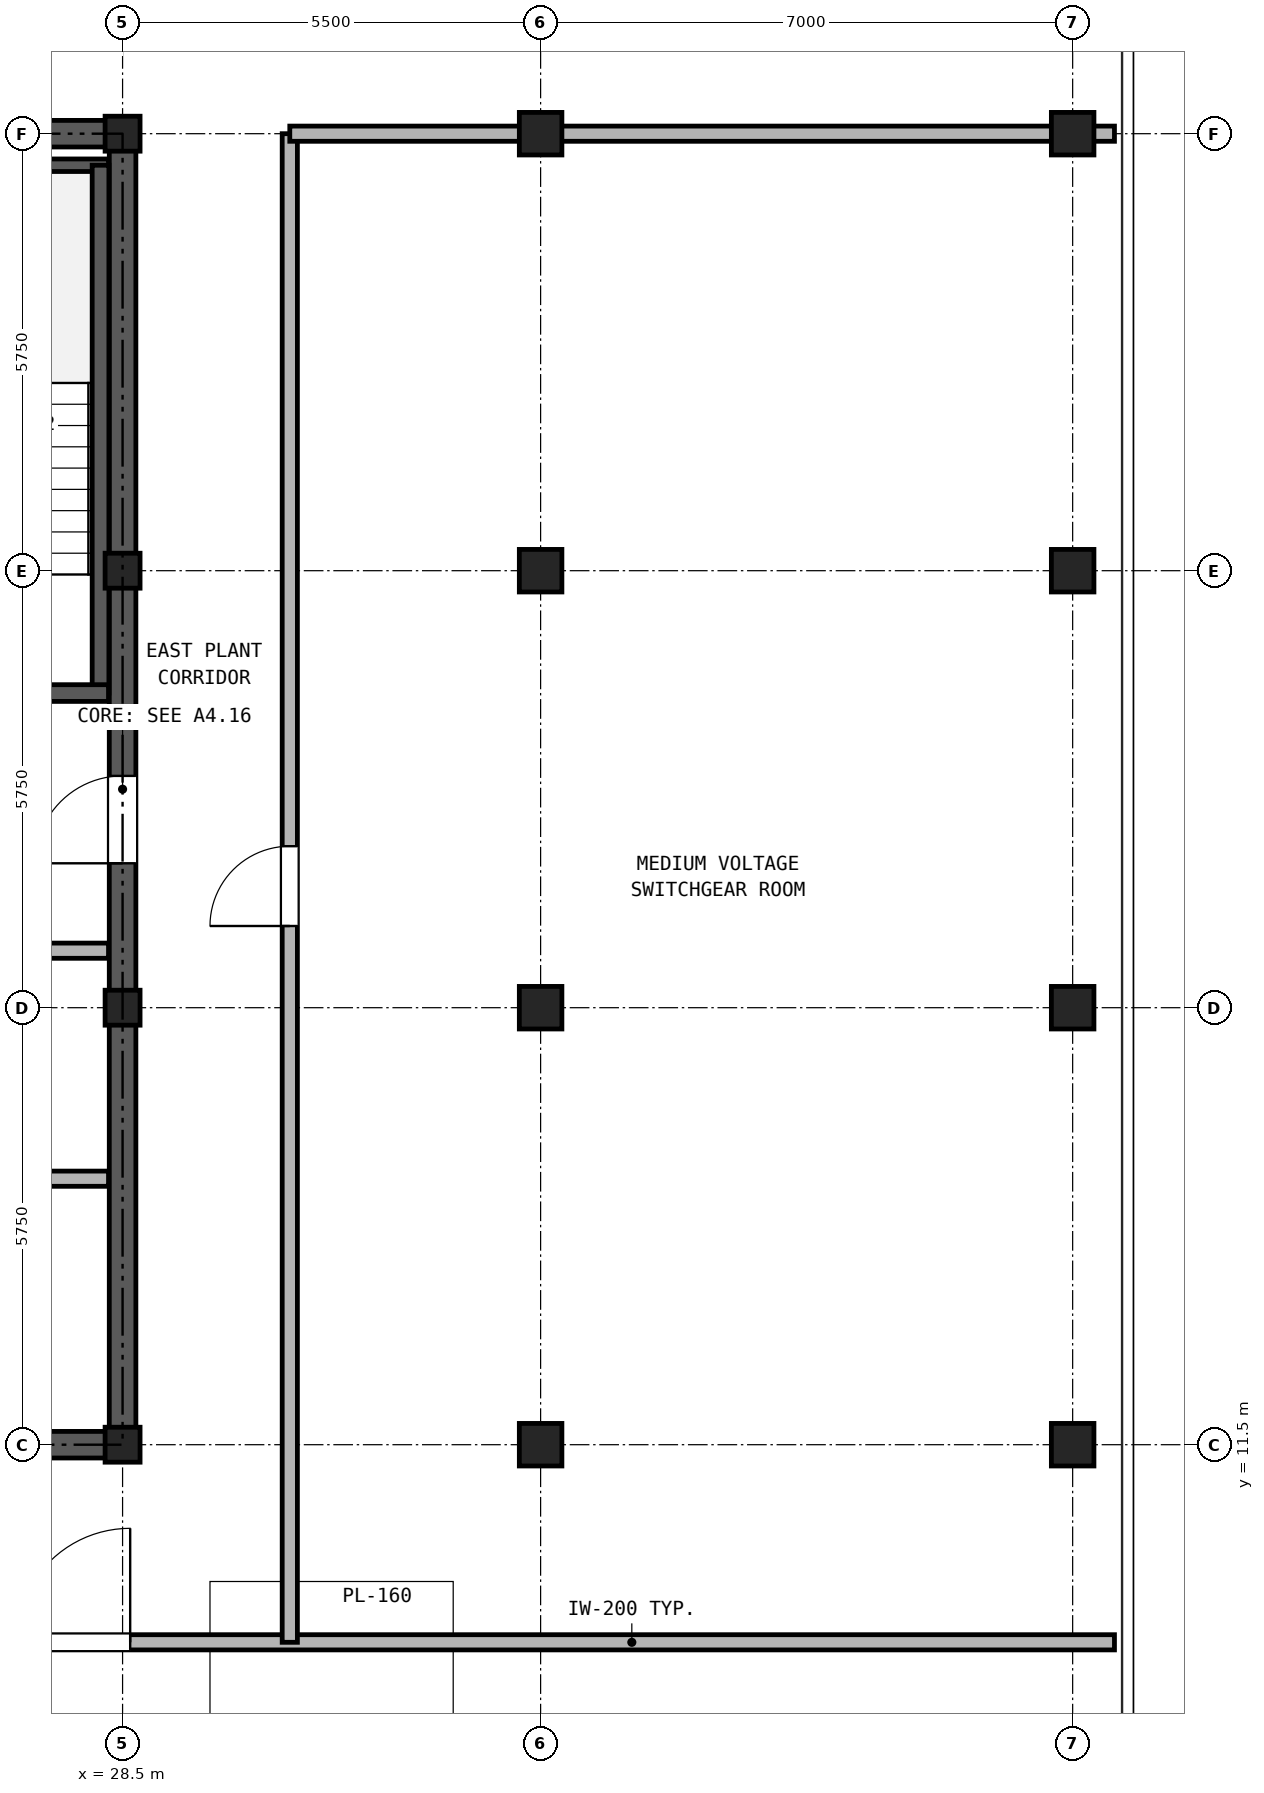
"""IFC4 building model, lengths in metres.
Left out: names, types, materials, properties, quantities, classifications, styles, units other than length and angle.
Written with IfcOpenShell. Run it as: python <this file> out.ifc"""

import sys

from ifc_helpers import new_model, si_unit, direction, frame, frame_2d, origin, origin_2d, place, context, subcontext, project, spatial, rectangle, hollow_rectangle, extrude, source, transform, mapped, element, fill, save


model = new_model("IFC4")
c1 = context("Model", 3, precision=1e-05, world=origin(), true_north=direction((0.0, 1.0)))
c2 = subcontext(c1, "Body", "Model", "MODEL_VIEW")
j1 = project(units=[si_unit("LENGTHUNIT", "METRE"), si_unit("PLANEANGLEUNIT", "RADIAN")], contexts=[c1])
p1 = place(None, origin())
s1 = spatial("IfcSite", under=j1, at=p1, CompositionType="ELEMENT")
p2 = place(p1, origin())
s2 = spatial("IfcBuilding", under=s1, at=p2, CompositionType="ELEMENT")
p3 = place(p2, frame((0.0, 0.0, 282.1)))
s3 = spatial("IfcBuildingStorey", under=s2, at=p3, CompositionType="ELEMENT", Elevation=282.1)
m1 = source(origin(), c2, "Body", "SweptSolid", [
    extrude(hollow_rectangle(XDim=0.56, YDim=0.56, WallThickness=0.03, at=origin_2d()), origin(), (0.0, 0.0, 1.0), 3.38),
])
for number, where, z_axis, x_axis in (
    (1, (41.0, 11.5, 0.0), (0.0, 0.0, 1.0), (1.0, 0.0, 0.0)),
    (2, (41.0, 17.25, 0.0), (0.0, 0.0, 1.0), (1.0, 0.0, 0.0)),
    (3, (41.0, 23.0, 0.0), (0.0, 0.0, 1.0), (1.0, 0.0, 0.0)),
    (4, (41.0, 28.75, 0.0), (0.0, 0.0, 1.0), (1.0, 0.0, 0.0)),
):
    element("IfcColumn", number, at=place(p3, frame(where, z_axis=z_axis, x_axis=x_axis)), inside=s3, PredefinedType="COLUMN", context=c2, shape_type="MappedRepresentation", body=[
        mapped(m1, transform((0.0, 0.0, 0.0), x_axis=(1.0, 0.0, 0.0), y_axis=(0.0, 1.0, 0.0), z_axis=(0.0, 0.0, 1.0), scale=1.0)),
    ])
m2 = source(origin(), c2, "Body", "SweptSolid", [
    extrude(hollow_rectangle(XDim=0.46, YDim=0.46, WallThickness=0.025, at=origin_2d()), origin(), (0.0, 0.0, 1.0), 3.38),
])
for number, where, z_axis, x_axis in (
    (5, (28.5, 11.5, 0.0), (0.0, 0.0, 1.0), (1.0, 0.0, 0.0)),
    (6, (28.5, 17.25, 0.0), (0.0, 0.0, 1.0), (1.0, 0.0, 0.0)),
    (7, (28.5, 23.0, 0.0), (0.0, 0.0, 1.0), (1.0, 0.0, 0.0)),
    (8, (28.5, 28.75, 0.0), (0.0, 0.0, 1.0), (1.0, 0.0, 0.0)),
):
    element("IfcColumn", number, at=place(p3, frame(where, z_axis=z_axis, x_axis=x_axis)), inside=s3, PredefinedType="COLUMN", context=c2, shape_type="MappedRepresentation", body=[
        mapped(m2, transform((0.0, 0.0, 0.0), x_axis=(1.0, 0.0, 0.0), y_axis=(0.0, 1.0, 0.0), z_axis=(0.0, 0.0, 1.0), scale=1.0)),
    ])
for number, where, z_axis, x_axis in (
    (9, (34.0, 11.5, 0.0), (0.0, 0.0, 1.0), (1.0, 0.0, 0.0)),
    (10, (34.0, 17.25, 0.0), (0.0, 0.0, 1.0), (1.0, 0.0, 0.0)),
    (11, (34.0, 23.0, 0.0), (0.0, 0.0, 1.0), (1.0, 0.0, 0.0)),
    (12, (34.0, 28.75, 0.0), (0.0, 0.0, 1.0), (1.0, 0.0, 0.0)),
):
    element("IfcColumn", number, at=place(p3, frame(where, z_axis=z_axis, x_axis=x_axis)), inside=s3, PredefinedType="COLUMN", context=c2, shape_type="MappedRepresentation", body=[
        mapped(m1, transform((0.0, 0.0, 0.0), x_axis=(1.0, 0.0, 0.0), y_axis=(0.0, 1.0, 0.0), z_axis=(0.0, 0.0, 1.0), scale=1.0)),
    ])
p4 = place(p3, frame((18.325, 11.5, 0.0), z_axis=(0.0, 0.0, 1.0), x_axis=(1.0, 0.0, 0.0)))
e13 = element("IfcWall", 13, at=p4, inside=s3, PredefinedType="SHEAR", context=c2, shape_type="SweptSolid", body=[
    extrude(rectangle(XDim=10.35, YDim=0.35, at=frame_2d((5.175, 0.0))), origin(), (0.0, 0.0, 1.0), 3.38),
])
p5 = place(p4, frame((4.375, 0.0, 0.0)))
e14 = element("IfcOpeningElement", 14, at=p5, cuts=e13, PredefinedType="OPENING", context=c2, shape_type="SweptSolid", body=[
    extrude(rectangle(XDim=1.5, YDim=2.25, at=frame_2d((0.75, 1.125))), frame((0.0, 0.185, 0.0), z_axis=(0.0, -1.0, 0.0), x_axis=(1.0, 0.0, 0.0)), (0.0, 0.0, 1.0), 0.37),
])
p6 = place(p3, frame((18.325, 28.75, 0.0), z_axis=(0.0, 0.0, 1.0), x_axis=(1.0, 0.0, 0.0)))
e15 = element("IfcWall", 15, at=p6, inside=s3, PredefinedType="SHEAR", context=c2, shape_type="SweptSolid", body=[
    extrude(rectangle(XDim=10.35, YDim=0.35, at=frame_2d((5.175, 0.0))), origin(), (0.0, 0.0, 1.0), 3.38),
])
p7 = place(p6, frame((4.055, 0.0, 0.0)))
e16 = element("IfcOpeningElement", 16, at=p7, cuts=e15, PredefinedType="OPENING", context=c2, shape_type="SweptSolid", body=[
    extrude(rectangle(XDim=0.9, YDim=2.05, at=frame_2d((0.45, 1.025))), frame((0.0, 0.185, 0.0), z_axis=(0.0, -1.0, 0.0), x_axis=(1.0, 0.0, 0.0)), (0.0, 0.0, 1.0), 0.37),
])
p8 = place(p6, frame((5.595, 0.0, 0.0)))
e17 = element("IfcOpeningElement", 17, at=p8, cuts=e15, PredefinedType="OPENING", context=c2, shape_type="SweptSolid", body=[
    extrude(rectangle(XDim=0.9, YDim=2.05, at=frame_2d((0.45, 1.025))), frame((0.0, 0.185, 0.0), z_axis=(0.0, -1.0, 0.0), x_axis=(1.0, 0.0, 0.0)), (0.0, 0.0, 1.0), 0.37),
])
p9 = place(p3, frame((28.5, 11.675, 0.0), z_axis=(0.0, 0.0, 1.0), x_axis=(0.0, 1.0, 0.0)))
e18 = element("IfcWall", 18, at=p9, inside=s3, PredefinedType="SHEAR", context=c2, shape_type="SweptSolid", body=[
    extrude(rectangle(XDim=16.9, YDim=0.35, at=frame_2d((8.45, 0.0))), origin(), (0.0, 0.0, 1.0), 3.38),
])
p10 = place(p9, frame((7.475, 0.0, 0.0)))
e19 = element("IfcOpeningElement", 19, at=p10, cuts=e18, PredefinedType="OPENING", context=c2, shape_type="SweptSolid", body=[
    extrude(rectangle(XDim=1.15, YDim=2.2, at=frame_2d((0.575, 1.1))), frame((0.0, 0.185, 0.0), z_axis=(0.0, -1.0, 0.0), x_axis=(1.0, 0.0, 0.0)), (0.0, 0.0, 1.0), 0.37),
])
p11 = place(p3, frame((25.13, 28.335, 0.0), z_axis=(0.0, 0.0, 1.0), x_axis=(1.0, 0.0, 0.0)))
e20 = element("IfcWall", 20, at=p11, inside=s3, PredefinedType="PARTITIONING", context=c2, shape_type="SweptSolid", body=[
    extrude(rectangle(XDim=3.185, YDim=0.165, at=frame_2d((1.593, 0.0))), origin(), (0.0, 0.0, 1.0), 3.38),
])
p12 = place(p3, frame((28.21, 21.39, 0.0), z_axis=(0.0, 0.0, 1.0), x_axis=(0.0, 1.0, 0.0)))
e21 = element("IfcWall", 21, at=p12, inside=s3, PredefinedType="SOLIDWALL", context=c2, shape_type="SweptSolid", body=[
    extrude(rectangle(XDim=6.945, YDim=0.22, at=frame_2d((3.473, 0.0))), origin(), (0.0, 0.0, 1.0), 3.38),
])
p13 = place(p3, frame((25.13, 21.39, 0.0), z_axis=(0.0, 0.0, 1.0), x_axis=(1.0, 0.0, 0.0)))
e22 = element("IfcWall", 22, at=p13, inside=s3, PredefinedType="SOLIDWALL", context=c2, shape_type="SweptSolid", body=[
    extrude(rectangle(XDim=3.185, YDim=0.22, at=frame_2d((1.593, 0.0))), origin(), (0.0, 0.0, 1.0), 3.38),
])
p14 = place(p13, frame((0.92, 0.0, 0.0)))
e23 = element("IfcOpeningElement", 23, at=p14, cuts=e22, PredefinedType="OPENING", context=c2, shape_type="SweptSolid", body=[
    extrude(rectangle(XDim=1.15, YDim=2.2, at=frame_2d((0.575, 1.1))), frame((0.0, 0.12, 0.0), z_axis=(0.0, -1.0, 0.0), x_axis=(1.0, 0.0, 0.0)), (0.0, 0.0, 1.0), 0.24),
])
p15 = place(p3, frame((18.685, 18.0, 0.0), z_axis=(0.0, 0.0, 1.0), x_axis=(1.0, 0.0, 0.0)))
e24 = element("IfcWall", 24, at=p15, inside=s3, PredefinedType="PARTITIONING", context=c2, shape_type="SweptSolid", body=[
    extrude(rectangle(XDim=9.63, YDim=0.2, at=frame_2d((4.815, 0.0))), origin(), (0.0, 0.0, 1.0), 3.38),
])
p16 = place(p15, frame((0.565, 0.0, 0.0)))
e25 = element("IfcOpeningElement", 25, at=p16, cuts=e24, PredefinedType="OPENING", context=c2, shape_type="SweptSolid", body=[
    extrude(rectangle(XDim=1.3, YDim=2.3, at=frame_2d((0.65, 1.15))), frame((0.0, 0.11, 0.0), z_axis=(0.0, -1.0, 0.0), x_axis=(1.0, 0.0, 0.0)), (0.0, 0.0, 1.0), 0.22),
])
p17 = place(p15, frame((2.665, 0.0, 0.0)))
e26 = element("IfcOpeningElement", 26, at=p17, cuts=e24, PredefinedType="OPENING", context=c2, shape_type="SweptSolid", body=[
    extrude(rectangle(XDim=1.3, YDim=2.3, at=frame_2d((0.65, 1.15))), frame((0.0, 0.11, 0.0), z_axis=(0.0, -1.0, 0.0), x_axis=(1.0, 0.0, 0.0)), (0.0, 0.0, 1.0), 0.22),
])
p18 = place(p15, frame((7.165, 0.0, 0.0)))
e27 = element("IfcOpeningElement", 27, at=p18, cuts=e24, PredefinedType="OPENING", context=c2, shape_type="SweptSolid", body=[
    extrude(rectangle(XDim=1.0, YDim=2.15, at=frame_2d((0.5, 1.075))), frame((0.0, 0.11, 0.0), z_axis=(0.0, -1.0, 0.0), x_axis=(1.0, 0.0, 0.0)), (0.0, 0.0, 1.0), 0.22),
])
p19 = place(p3, frame((18.685, 15.0, 0.0), z_axis=(0.0, 0.0, 1.0), x_axis=(1.0, 0.0, 0.0)))
e28 = element("IfcWall", 28, at=p19, inside=s3, PredefinedType="PARTITIONING", context=c2, shape_type="SweptSolid", body=[
    extrude(rectangle(XDim=9.63, YDim=0.2, at=frame_2d((4.815, 0.0))), origin(), (0.0, 0.0, 1.0), 3.38),
])
p20 = place(p3, frame((12.45, 8.9, 0.0), z_axis=(0.0, 0.0, 1.0), x_axis=(1.0, 0.0, 0.0)))
e29 = element("IfcWall", 29, at=p20, inside=s3, PredefinedType="PARTITIONING", context=c2, shape_type="SweptSolid", body=[
    extrude(rectangle(XDim=29.1, YDim=0.2, at=frame_2d((14.55, 0.0))), origin(), (0.0, 0.0, 1.0), 3.38),
])
p21 = place(p20, frame((7.45, 0.0, 0.0)))
e30 = element("IfcOpeningElement", 30, at=p21, cuts=e29, PredefinedType="OPENING", context=c2, shape_type="SweptSolid", body=[
    extrude(rectangle(XDim=1.5, YDim=2.25, at=frame_2d((0.75, 1.125))), frame((0.0, 0.11, 0.0), z_axis=(0.0, -1.0, 0.0), x_axis=(1.0, 0.0, 0.0)), (0.0, 0.0, 1.0), 0.22),
])
p22 = place(p20, frame((14.65, 0.0, 0.0)))
e31 = element("IfcOpeningElement", 31, at=p22, cuts=e29, PredefinedType="OPENING", context=c2, shape_type="SweptSolid", body=[
    extrude(rectangle(XDim=1.5, YDim=2.25, at=frame_2d((0.75, 1.125))), frame((0.0, 0.11, 0.0), z_axis=(0.0, -1.0, 0.0), x_axis=(1.0, 0.0, 0.0)), (0.0, 0.0, 1.0), 0.22),
])
p23 = place(p3, frame((30.7, 8.9, 0.0), z_axis=(0.0, 0.0, 1.0), x_axis=(0.0, 1.0, 0.0)))
e32 = element("IfcWall", 32, at=p23, inside=s3, PredefinedType="PARTITIONING", context=c2, shape_type="SweptSolid", body=[
    extrude(rectangle(XDim=19.85, YDim=0.2, at=frame_2d((9.925, 0.0))), origin(), (0.0, 0.0, 1.0), 3.38),
])
p24 = place(p23, frame((9.425, 0.0, 0.0)))
e33 = element("IfcOpeningElement", 33, at=p24, cuts=e32, PredefinedType="OPENING", context=c2, shape_type="SweptSolid", body=[
    extrude(rectangle(XDim=1.05, YDim=2.15, at=frame_2d((0.525, 1.075))), frame((0.0, 0.11, 0.0), z_axis=(0.0, -1.0, 0.0), x_axis=(1.0, 0.0, 0.0)), (0.0, 0.0, 1.0), 0.22),
])
p25 = place(p3, frame((30.7, 28.75, 0.0), z_axis=(0.0, 0.0, 1.0), x_axis=(1.0, 0.0, 0.0)))
e34 = element("IfcWall", 34, at=p25, inside=s3, PredefinedType="PARTITIONING", context=c2, shape_type="SweptSolid", body=[
    extrude(rectangle(XDim=10.85, YDim=0.2, at=frame_2d((5.425, 0.0))), origin(), (0.0, 0.0, 1.0), 2.905),
])
p26 = place(p10, origin())
e35 = element("IfcDoor", 35, at=p26, inside=s3, OperationType="SINGLE_SWING_LEFT", PredefinedType="DOOR", context=c2, shape_type="SweptSolid", body=[
    extrude(rectangle(XDim=1.15, YDim=2.2, at=frame_2d((0.575, 1.1))), frame((0.0, 0.025, 0.0), z_axis=(0.0, -1.0, 0.0), x_axis=(1.0, 0.0, 0.0)), (0.0, 0.0, 1.0), 0.05),
])
fill(e19, e35)
p27 = place(p22, frame((1.5, 0.0, 0.0), z_axis=(0.0, 0.0, 1.0), x_axis=(-1.0, 0.0, 0.0)))
e36 = element("IfcDoor", 36, at=p27, inside=s3, OperationType="SINGLE_SWING_RIGHT", PredefinedType="DOOR", context=c2, shape_type="SweptSolid", body=[
    extrude(rectangle(XDim=1.5, YDim=2.25, at=frame_2d((0.75, 1.125))), frame((0.0, 0.025, 0.0), z_axis=(0.0, -1.0, 0.0), x_axis=(1.0, 0.0, 0.0)), (0.0, 0.0, 1.0), 0.05),
])
fill(e31, e36)
p28 = place(p24, origin())
e37 = element("IfcDoor", 37, at=p28, inside=s3, OperationType="SINGLE_SWING_LEFT", PredefinedType="DOOR", context=c2, shape_type="SweptSolid", body=[
    extrude(rectangle(XDim=1.05, YDim=2.15, at=frame_2d((0.525, 1.075))), frame((0.0, 0.025, 0.0), z_axis=(0.0, -1.0, 0.0), x_axis=(1.0, 0.0, 0.0)), (0.0, 0.0, 1.0), 0.05),
])
fill(e33, e37)
save(model, sys.argv[1])
